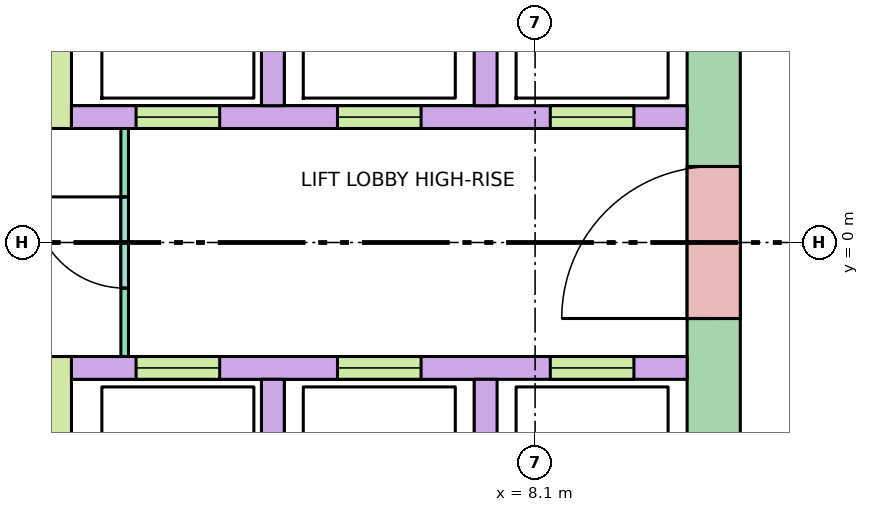
"""IFC4 building model, lengths in metres.
Left out: names, types, materials, properties, quantities, classifications, styles, units other than length and angle.
Written with IfcOpenShell. Run it as: python <this file> out.ifc"""

import sys

from ifc_helpers import new_model, si_unit, direction, frame, frame_2d, origin, place, context, subcontext, project, spatial, rectangle, extrude, element, fill, save


model = new_model("IFC4")
c1 = context("Model", 3, precision=1e-05, world=origin(), true_north=direction((0.0, 1.0)))
c2 = subcontext(c1, "Body", "Model", "MODEL_VIEW")
j1 = project(units=[si_unit("LENGTHUNIT", "METRE"), si_unit("PLANEANGLEUNIT", "RADIAN")], contexts=[c1])
p1 = place(None, origin())
s1 = spatial("IfcSite", under=j1, at=p1, CompositionType="ELEMENT")
p2 = place(p1, origin())
s2 = spatial("IfcBuilding", under=s1, at=p2, CompositionType="ELEMENT")
p3 = place(p2, frame((0.0, 0.0, 218.7)))
s3 = spatial("IfcBuildingStorey", under=s2, at=p3, CompositionType="ELEMENT", Elevation=218.7)
p4 = place(p3, frame((10.45, -5.13, -0.28), z_axis=(0.0, 0.0, 1.0), x_axis=(0.0, 1.0, 0.0)))
e1 = element("IfcWall", 1, at=p4, inside=s3, PredefinedType="SHEAR", context=c2, shape_type="SweptSolid", body=[
    extrude(rectangle(XDim=10.26, YDim=0.7, at=frame_2d((5.13, 0.0))), origin(), (0.0, 0.0, 1.0), 7.4),
])
p5 = place(p4, frame((4.13, 0.0, 0.28)))
e2 = element("IfcOpeningElement", 2, at=p5, cuts=e1, PredefinedType="OPENING", context=c2, shape_type="SweptSolid", body=[
    extrude(rectangle(XDim=2.0, YDim=2.1, at=frame_2d((1.0, 1.05))), frame((0.0, 0.36, 0.0), z_axis=(0.0, -1.0, 0.0), x_axis=(1.0, 0.0, 0.0)), (0.0, 0.0, 1.0), 0.72),
])
p6 = place(p3, frame((2.0, 1.65, 0.0), z_axis=(0.0, 0.0, 1.0), x_axis=(1.0, 0.0, 0.0)))
e3 = element("IfcWall", 3, at=p6, inside=s3, PredefinedType="SOLIDWALL", context=c2, shape_type="SweptSolid", body=[
    extrude(rectangle(XDim=8.1, YDim=0.3, at=frame_2d((4.05, 0.0))), origin(), (0.0, 0.0, 1.0), 7.12),
])
p7 = place(p6, frame((0.85, 0.0, 0.0)))
e4 = element("IfcOpeningElement", 4, at=p7, cuts=e3, PredefinedType="OPENING", context=c2, shape_type="SweptSolid", body=[
    extrude(rectangle(XDim=1.1, YDim=2.1, at=frame_2d((0.55, 1.05))), frame((0.0, 0.16, 0.0), z_axis=(0.0, -1.0, 0.0), x_axis=(1.0, 0.0, 0.0)), (0.0, 0.0, 1.0), 0.32),
])
p8 = place(p6, frame((3.5, 0.0, 0.0)))
e5 = element("IfcOpeningElement", 5, at=p8, cuts=e3, PredefinedType="OPENING", context=c2, shape_type="SweptSolid", body=[
    extrude(rectangle(XDim=1.1, YDim=2.1, at=frame_2d((0.55, 1.05))), frame((0.0, 0.16, 0.0), z_axis=(0.0, -1.0, 0.0), x_axis=(1.0, 0.0, 0.0)), (0.0, 0.0, 1.0), 0.32),
])
p9 = place(p6, frame((6.3, 0.0, 0.0)))
e6 = element("IfcOpeningElement", 6, at=p9, cuts=e3, PredefinedType="OPENING", context=c2, shape_type="SweptSolid", body=[
    extrude(rectangle(XDim=1.1, YDim=2.1, at=frame_2d((0.55, 1.05))), frame((0.0, 0.16, 0.0), z_axis=(0.0, -1.0, 0.0), x_axis=(1.0, 0.0, 0.0)), (0.0, 0.0, 1.0), 0.32),
])
p10 = place(p3, frame((2.0, -1.65, 0.0), z_axis=(0.0, 0.0, 1.0), x_axis=(1.0, 0.0, 0.0)))
e7 = element("IfcWall", 7, at=p10, inside=s3, PredefinedType="SOLIDWALL", context=c2, shape_type="SweptSolid", body=[
    extrude(rectangle(XDim=8.1, YDim=0.3, at=frame_2d((4.05, 0.0))), origin(), (0.0, 0.0, 1.0), 7.12),
])
p11 = place(p10, frame((0.85, 0.0, 0.0)))
e8 = element("IfcOpeningElement", 8, at=p11, cuts=e7, PredefinedType="OPENING", context=c2, shape_type="SweptSolid", body=[
    extrude(rectangle(XDim=1.1, YDim=2.1, at=frame_2d((0.55, 1.05))), frame((0.0, 0.16, 0.0), z_axis=(0.0, -1.0, 0.0), x_axis=(1.0, 0.0, 0.0)), (0.0, 0.0, 1.0), 0.32),
])
p12 = place(p10, frame((3.5, 0.0, 0.0)))
e9 = element("IfcOpeningElement", 9, at=p12, cuts=e7, PredefinedType="OPENING", context=c2, shape_type="SweptSolid", body=[
    extrude(rectangle(XDim=1.1, YDim=2.1, at=frame_2d((0.55, 1.05))), frame((0.0, 0.16, 0.0), z_axis=(0.0, -1.0, 0.0), x_axis=(1.0, 0.0, 0.0)), (0.0, 0.0, 1.0), 0.32),
])
p13 = place(p10, frame((6.3, 0.0, 0.0)))
e10 = element("IfcOpeningElement", 10, at=p13, cuts=e7, PredefinedType="OPENING", context=c2, shape_type="SweptSolid", body=[
    extrude(rectangle(XDim=1.1, YDim=2.1, at=frame_2d((0.55, 1.05))), frame((0.0, 0.16, 0.0), z_axis=(0.0, -1.0, 0.0), x_axis=(1.0, 0.0, 0.0)), (0.0, 0.0, 1.0), 0.32),
])
for number, where, z_axis, x_axis in (
    (11, (4.65, 1.8, 0.0), (0.0, 0.0, 1.0), (0.0, 1.0, 0.0)),
    (12, (4.65, -4.2, 0.0), (0.0, 0.0, 1.0), (0.0, 1.0, 0.0)),
    (13, (7.45, 1.8, 0.0), (0.0, 0.0, 1.0), (0.0, 1.0, 0.0)),
    (14, (7.45, -4.2, 0.0), (0.0, 0.0, 1.0), (0.0, 1.0, 0.0)),
):
    element("IfcWall", number, at=place(p3, frame(where, z_axis=z_axis, x_axis=x_axis)), inside=s3, PredefinedType="SOLIDWALL", context=c2, shape_type="SweptSolid", body=[
        extrude(rectangle(XDim=2.4, YDim=0.3, at=frame_2d((1.2, 0.0))), origin(), (0.0, 0.0, 1.0), 7.12),
    ])
for number, where, z_axis, x_axis in (
    (15, (1.85, 1.5, 0.0), (0.0, 0.0, 1.0), (0.0, 1.0, 0.0)),
    (16, (1.85, -8.1, 0.0), (0.0, 0.0, 1.0), (0.0, 1.0, 0.0)),
):
    element("IfcWall", number, at=place(p3, frame(where, z_axis=z_axis, x_axis=x_axis)), inside=s3, PredefinedType="SHEAR", context=c2, shape_type="SweptSolid", body=[
        extrude(rectangle(XDim=6.6, YDim=0.3, at=frame_2d((3.3, 0.0))), origin(), (0.0, 0.0, 1.0), 7.12),
    ])
p14 = place(p3, frame((2.7, -1.5, 0.0), z_axis=(0.0, 0.0, 1.0), x_axis=(0.0, 1.0, 0.0)))
e17 = element("IfcWall", 17, at=p14, inside=s3, PredefinedType="PARTITIONING", context=c2, shape_type="SweptSolid", body=[
    extrude(rectangle(XDim=3.0, YDim=0.1, at=frame_2d((1.5, 0.0))), origin(), (0.0, 0.0, 1.0), 7.12),
])
p15 = place(p14, frame((0.9, 0.0, 0.0)))
e18 = element("IfcOpeningElement", 18, at=p15, cuts=e17, PredefinedType="OPENING", context=c2, shape_type="SweptSolid", body=[
    extrude(rectangle(XDim=1.2, YDim=2.1, at=frame_2d((0.6, 1.05))), frame((0.0, 0.06, 0.0), z_axis=(0.0, -1.0, 0.0), x_axis=(1.0, 0.0, 0.0)), (0.0, 0.0, 1.0), 0.12),
])
p16 = place(p7, origin())
e19 = element("IfcDoor", 19, at=p16, inside=s3, OperationType="DOUBLE_DOOR_SLIDING", PredefinedType="DOOR", context=c2, shape_type="SweptSolid", body=[
    extrude(rectangle(XDim=1.1, YDim=2.1, at=frame_2d((0.55, 1.05))), frame((0.0, 0.025, 0.0), z_axis=(0.0, -1.0, 0.0), x_axis=(1.0, 0.0, 0.0)), (0.0, 0.0, 1.0), 0.05),
])
fill(e4, e19)
p17 = place(p8, origin())
e20 = element("IfcDoor", 20, at=p17, inside=s3, OperationType="DOUBLE_DOOR_SLIDING", PredefinedType="DOOR", context=c2, shape_type="SweptSolid", body=[
    extrude(rectangle(XDim=1.1, YDim=2.1, at=frame_2d((0.55, 1.05))), frame((0.0, 0.025, 0.0), z_axis=(0.0, -1.0, 0.0), x_axis=(1.0, 0.0, 0.0)), (0.0, 0.0, 1.0), 0.05),
])
fill(e5, e20)
p18 = place(p9, origin())
e21 = element("IfcDoor", 21, at=p18, inside=s3, OperationType="DOUBLE_DOOR_SLIDING", PredefinedType="DOOR", context=c2, shape_type="SweptSolid", body=[
    extrude(rectangle(XDim=1.1, YDim=2.1, at=frame_2d((0.55, 1.05))), frame((0.0, 0.025, 0.0), z_axis=(0.0, -1.0, 0.0), x_axis=(1.0, 0.0, 0.0)), (0.0, 0.0, 1.0), 0.05),
])
fill(e6, e21)
p19 = place(p11, origin())
e22 = element("IfcDoor", 22, at=p19, inside=s3, OperationType="DOUBLE_DOOR_SLIDING", PredefinedType="DOOR", context=c2, shape_type="SweptSolid", body=[
    extrude(rectangle(XDim=1.1, YDim=2.1, at=frame_2d((0.55, 1.05))), frame((0.0, 0.025, 0.0), z_axis=(0.0, -1.0, 0.0), x_axis=(1.0, 0.0, 0.0)), (0.0, 0.0, 1.0), 0.05),
])
fill(e8, e22)
p20 = place(p12, origin())
e23 = element("IfcDoor", 23, at=p20, inside=s3, OperationType="DOUBLE_DOOR_SLIDING", PredefinedType="DOOR", context=c2, shape_type="SweptSolid", body=[
    extrude(rectangle(XDim=1.1, YDim=2.1, at=frame_2d((0.55, 1.05))), frame((0.0, 0.025, 0.0), z_axis=(0.0, -1.0, 0.0), x_axis=(1.0, 0.0, 0.0)), (0.0, 0.0, 1.0), 0.05),
])
fill(e9, e23)
p21 = place(p13, origin())
e24 = element("IfcDoor", 24, at=p21, inside=s3, OperationType="DOUBLE_DOOR_SLIDING", PredefinedType="DOOR", context=c2, shape_type="SweptSolid", body=[
    extrude(rectangle(XDim=1.1, YDim=2.1, at=frame_2d((0.55, 1.05))), frame((0.0, 0.025, 0.0), z_axis=(0.0, -1.0, 0.0), x_axis=(1.0, 0.0, 0.0)), (0.0, 0.0, 1.0), 0.05),
])
fill(e10, e24)
p22 = place(p5, origin())
e25 = element("IfcDoor", 25, at=p22, inside=s3, OperationType="DOUBLE_DOOR_SINGLE_SWING", PredefinedType="DOOR", context=c2, shape_type="SweptSolid", body=[
    extrude(rectangle(XDim=2.0, YDim=2.1, at=frame_2d((1.0, 1.05))), frame((0.0, 0.025, 0.0), z_axis=(0.0, -1.0, 0.0), x_axis=(1.0, 0.0, 0.0)), (0.0, 0.0, 1.0), 0.05),
])
fill(e2, e25)
p23 = place(p15, origin())
e26 = element("IfcDoor", 26, at=p23, inside=s3, OperationType="SINGLE_SWING_RIGHT", PredefinedType="DOOR", context=c2, shape_type="SweptSolid", body=[
    extrude(rectangle(XDim=1.2, YDim=2.1, at=frame_2d((0.6, 1.05))), frame((0.0, 0.025, 0.0), z_axis=(0.0, -1.0, 0.0), x_axis=(1.0, 0.0, 0.0)), (0.0, 0.0, 1.0), 0.05),
])
fill(e18, e26)
save(model, sys.argv[1])
